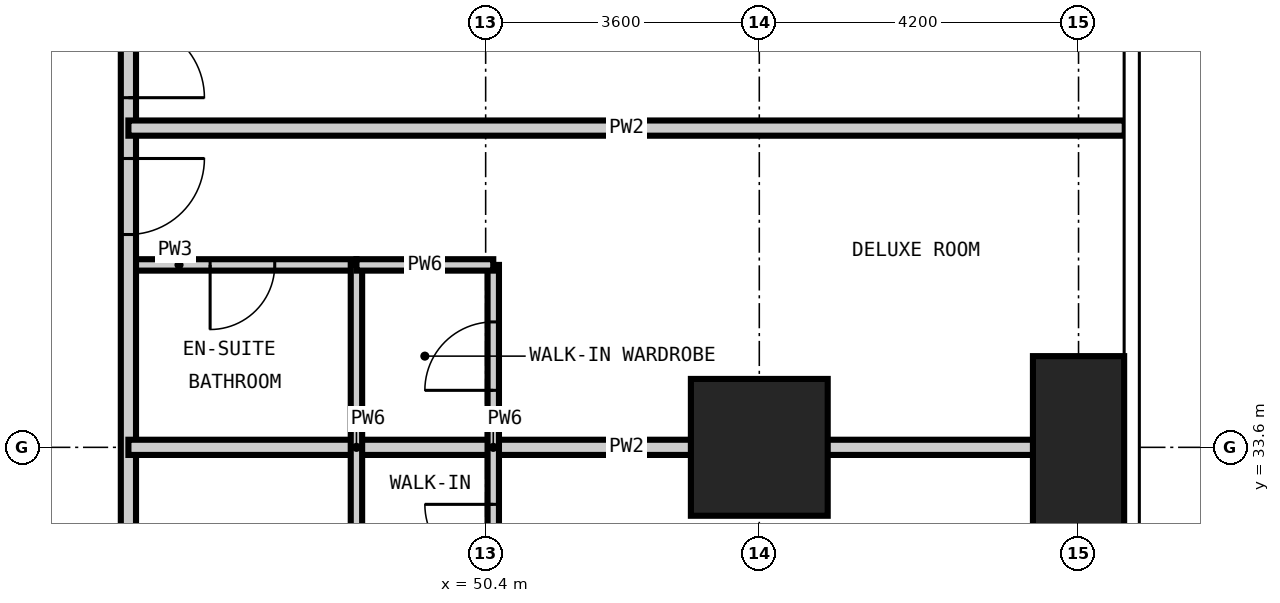
"""IFC4 building model, lengths in metres.
Left out: names, types, materials, properties, quantities, classifications, styles, units other than length and angle.
Written with IfcOpenShell. Run it as: python <this file> out.ifc"""

import sys

from ifc_helpers import new_model, si_unit, direction, frame, frame_2d, origin, origin_2d, place, context, subcontext, project, spatial, rectangle, extrude, element, fill, save


model = new_model("IFC4")
c1 = context("Model", 3, precision=1e-05, world=origin(), true_north=direction((0.0, 1.0)))
c2 = subcontext(c1, "Body", "Model", "MODEL_VIEW")
j1 = project(units=[si_unit("LENGTHUNIT", "METRE"), si_unit("PLANEANGLEUNIT", "RADIAN")], contexts=[c1])
p1 = place(None, origin())
s1 = spatial("IfcSite", under=j1, at=p1, CompositionType="ELEMENT")
p2 = place(p1, origin())
s2 = spatial("IfcBuilding", under=s1, at=p2, CompositionType="ELEMENT")
p3 = place(p2, frame((0.0, 0.0, 27.0)))
s3 = spatial("IfcBuildingStorey", under=s2, at=p3, CompositionType="ELEMENT", Elevation=27.0)
p4 = place(p3, frame((54.0, 33.6, -0.35), z_axis=(0.0, 0.0, 1.0), x_axis=(1.0, 0.0, 0.0)))
e1 = element("IfcColumn", 1, at=p4, inside=s3, PredefinedType="COLUMN", context=c2, shape_type="SweptSolid", body=[
    extrude(rectangle(XDim=1.8, YDim=1.8, at=origin_2d()), origin(), (0.0, 0.0, 1.0), 3.6),
])
p5 = place(p3, frame((58.2, 33.6, -0.35), z_axis=(0.0, 0.0, 1.0), x_axis=(1.0, 0.0, 0.0)))
e2 = element("IfcColumn", 2, at=p5, inside=s3, PredefinedType="COLUMN", context=c2, shape_type="SweptSolid", body=[
    extrude(rectangle(XDim=1.2, YDim=2.4, at=origin_2d()), origin(), (0.0, 0.0, 1.0), 3.6),
])
p6 = place(p3, frame((45.7, 36.0, 0.0), z_axis=(0.0, 0.0, 1.0), x_axis=(1.0, 0.0, 0.0)))
e3 = element("IfcWall", 3, at=p6, inside=s3, PredefinedType="PARTITIONING", context=c2, shape_type="SweptSolid", body=[
    extrude(rectangle(XDim=3.0, YDim=0.15, at=frame_2d((1.5, 0.0))), origin(), (0.0, 0.0, 1.0), 3.25),
])
p7 = place(p6, frame((1.075, 0.0, 0.0)))
e4 = element("IfcOpeningElement", 4, at=p7, cuts=e3, PredefinedType="OPENING", context=c2, shape_type="SweptSolid", body=[
    extrude(rectangle(XDim=0.85, YDim=2.1, at=frame_2d((0.425, 1.05))), frame((0.0, 0.085, 0.0), z_axis=(0.0, -1.0, 0.0), x_axis=(1.0, 0.0, 0.0)), (0.0, 0.0, 1.0), 0.17),
])
p8 = place(p3, frame((45.7, 46.0, 0.0), z_axis=(0.0, 0.0, 1.0), x_axis=(0.0, -1.0, 0.0)))
e5 = element("IfcWall", 5, at=p8, inside=s3, PredefinedType="PARTITIONING", context=c2, shape_type="SweptSolid", body=[
    extrude(rectangle(XDim=32.6, YDim=0.2, at=frame_2d((16.3, 0.0))), origin(), (0.0, 0.0, 1.0), 3.25),
])
p9 = place(p8, frame((26.6, 0.0, 0.0)))
e6 = element("IfcOpeningElement", 6, at=p9, cuts=e5, PredefinedType="OPENING", context=c2, shape_type="SweptSolid", body=[
    extrude(rectangle(XDim=1.0, YDim=2.2, at=frame_2d((0.5, 1.1))), frame((0.0, 0.11, 0.0), z_axis=(0.0, -1.0, 0.0), x_axis=(1.0, 0.0, 0.0)), (0.0, 0.0, 1.0), 0.22),
])
p10 = place(p8, frame((22.4, 0.0, 0.0)))
e7 = element("IfcOpeningElement", 7, at=p10, cuts=e5, PredefinedType="OPENING", context=c2, shape_type="SweptSolid", body=[
    extrude(rectangle(XDim=1.0, YDim=2.2, at=frame_2d((0.5, 1.1))), frame((0.0, 0.11, 0.0), z_axis=(0.0, -1.0, 0.0), x_axis=(1.0, 0.0, 0.0)), (0.0, 0.0, 1.0), 0.22),
])
p11 = place(p8, frame((17.0, 0.0, 0.0)))
e8 = element("IfcOpeningElement", 8, at=p11, cuts=e5, PredefinedType="OPENING", context=c2, shape_type="SweptSolid", body=[
    extrude(rectangle(XDim=1.0, YDim=2.2, at=frame_2d((0.5, 1.1))), frame((0.0, 0.11, 0.0), z_axis=(0.0, -1.0, 0.0), x_axis=(1.0, 0.0, 0.0)), (0.0, 0.0, 1.0), 0.22),
])
p12 = place(p8, frame((15.2, 0.0, 0.0)))
e9 = element("IfcOpeningElement", 9, at=p12, cuts=e5, PredefinedType="OPENING", context=c2, shape_type="SweptSolid", body=[
    extrude(rectangle(XDim=1.0, YDim=2.2, at=frame_2d((0.5, 1.1))), frame((0.0, 0.11, 0.0), z_axis=(0.0, -1.0, 0.0), x_axis=(1.0, 0.0, 0.0)), (0.0, 0.0, 1.0), 0.22),
])
p13 = place(p8, frame((8.6, 0.0, 0.0)))
e10 = element("IfcOpeningElement", 10, at=p13, cuts=e5, PredefinedType="OPENING", context=c2, shape_type="SweptSolid", body=[
    extrude(rectangle(XDim=1.0, YDim=2.2, at=frame_2d((0.5, 1.1))), frame((0.0, 0.11, 0.0), z_axis=(0.0, -1.0, 0.0), x_axis=(1.0, 0.0, 0.0)), (0.0, 0.0, 1.0), 0.22),
])
p14 = place(p8, frame((6.8, 0.0, 0.0)))
e11 = element("IfcOpeningElement", 11, at=p14, cuts=e5, PredefinedType="OPENING", context=c2, shape_type="SweptSolid", body=[
    extrude(rectangle(XDim=1.0, YDim=2.2, at=frame_2d((0.5, 1.1))), frame((0.0, 0.11, 0.0), z_axis=(0.0, -1.0, 0.0), x_axis=(1.0, 0.0, 0.0)), (0.0, 0.0, 1.0), 0.22),
])
p15 = place(p8, frame((30.4, 0.0, 0.0)))
e12 = element("IfcOpeningElement", 12, at=p15, cuts=e5, PredefinedType="OPENING", context=c2, shape_type="SweptSolid", body=[
    extrude(rectangle(XDim=1.0, YDim=2.2, at=frame_2d((0.5, 1.1))), frame((0.0, 0.11, 0.0), z_axis=(0.0, -1.0, 0.0), x_axis=(1.0, 0.0, 0.0)), (0.0, 0.0, 1.0), 0.22),
])
p16 = place(p8, frame((1.5, 0.0, 0.0)))
e13 = element("IfcOpeningElement", 13, at=p16, cuts=e5, PredefinedType="OPENING", context=c2, shape_type="SweptSolid", body=[
    extrude(rectangle(XDim=1.0, YDim=2.2, at=frame_2d((0.5, 1.1))), frame((0.0, 0.11, 0.0), z_axis=(0.0, -1.0, 0.0), x_axis=(1.0, 0.0, 0.0)), (0.0, 0.0, 1.0), 0.22),
])
for number, where, z_axis, x_axis in (
    (14, (45.7, 33.6, 0.0), (0.0, 0.0, 1.0), (1.0, 0.0, 0.0)),
    (15, (45.7, 37.8, 0.0), (0.0, 0.0, 1.0), (1.0, 0.0, 0.0)),
):
    element("IfcWall", number, at=place(p3, frame(where, z_axis=z_axis, x_axis=x_axis)), inside=s3, PredefinedType="PARTITIONING", context=c2, shape_type="SweptSolid", body=[
        extrude(rectangle(XDim=13.108, YDim=0.2, at=frame_2d((6.554, 0.0))), origin(), (0.0, 0.0, 1.0), 3.25),
    ])
p17 = place(p3, frame((48.7, 31.2, 0.0), z_axis=(0.0, 0.0, 1.0), x_axis=(0.0, 1.0, 0.0)))
e16 = element("IfcWall", 16, at=p17, inside=s3, PredefinedType="PARTITIONING", context=c2, shape_type="SweptSolid", body=[
    extrude(rectangle(XDim=4.8, YDim=0.15, at=frame_2d((2.4, 0.0))), origin(), (0.0, 0.0, 1.0), 3.25),
])
p18 = place(p3, frame((50.5, 31.2, 0.0), z_axis=(0.0, 0.0, 1.0), x_axis=(0.0, 1.0, 0.0)))
e17 = element("IfcWall", 17, at=p18, inside=s3, PredefinedType="PARTITIONING", context=c2, shape_type="SweptSolid", body=[
    extrude(rectangle(XDim=4.8, YDim=0.15, at=frame_2d((2.4, 0.0))), origin(), (0.0, 0.0, 1.0), 3.25),
])
p19 = place(p18, frame((0.75, 0.0, 0.0)))
e18 = element("IfcOpeningElement", 18, at=p19, cuts=e17, PredefinedType="OPENING", context=c2, shape_type="SweptSolid", body=[
    extrude(rectangle(XDim=0.9, YDim=2.1, at=frame_2d((0.45, 1.05))), frame((0.0, 0.085, 0.0), z_axis=(0.0, -1.0, 0.0), x_axis=(1.0, 0.0, 0.0)), (0.0, 0.0, 1.0), 0.17),
])
p20 = place(p18, frame((3.15, 0.0, 0.0)))
e19 = element("IfcOpeningElement", 19, at=p20, cuts=e17, PredefinedType="OPENING", context=c2, shape_type="SweptSolid", body=[
    extrude(rectangle(XDim=0.9, YDim=2.1, at=frame_2d((0.45, 1.05))), frame((0.0, 0.085, 0.0), z_axis=(0.0, -1.0, 0.0), x_axis=(1.0, 0.0, 0.0)), (0.0, 0.0, 1.0), 0.17),
])
p21 = place(p3, frame((48.7, 36.0, 0.0), z_axis=(0.0, 0.0, 1.0), x_axis=(1.0, 0.0, 0.0)))
e20 = element("IfcWall", 20, at=p21, inside=s3, PredefinedType="PARTITIONING", context=c2, shape_type="SweptSolid", body=[
    extrude(rectangle(XDim=1.8, YDim=0.15, at=frame_2d((0.9, 0.0))), origin(), (0.0, 0.0, 1.0), 3.25),
])
p22 = place(p19, origin())
e21 = element("IfcDoor", 21, at=p22, inside=s3, OperationType="SINGLE_SWING_RIGHT", PredefinedType="DOOR", context=c2, shape_type="SweptSolid", body=[
    extrude(rectangle(XDim=0.9, YDim=2.1, at=frame_2d((0.45, 1.05))), frame((0.0, 0.025, 0.0), z_axis=(0.0, -1.0, 0.0), x_axis=(1.0, 0.0, 0.0)), (0.0, 0.0, 1.0), 0.05),
])
fill(e18, e21)
p23 = place(p13, origin())
e22 = element("IfcDoor", 22, at=p23, inside=s3, OperationType="SINGLE_SWING_LEFT", PredefinedType="DOOR", context=c2, shape_type="SweptSolid", body=[
    extrude(rectangle(XDim=1.0, YDim=2.2, at=frame_2d((0.5, 1.1))), frame((0.0, 0.025, 0.0), z_axis=(0.0, -1.0, 0.0), x_axis=(1.0, 0.0, 0.0)), (0.0, 0.0, 1.0), 0.05),
])
fill(e10, e22)
p24 = place(p7, frame((0.85, 0.0, 0.0), z_axis=(0.0, 0.0, 1.0), x_axis=(-1.0, 0.0, 0.0)))
e23 = element("IfcDoor", 23, at=p24, inside=s3, OperationType="SINGLE_SWING_RIGHT", PredefinedType="DOOR", context=c2, shape_type="SweptSolid", body=[
    extrude(rectangle(XDim=0.85, YDim=2.1, at=frame_2d((0.425, 1.05))), frame((0.0, 0.025, 0.0), z_axis=(0.0, -1.0, 0.0), x_axis=(1.0, 0.0, 0.0)), (0.0, 0.0, 1.0), 0.05),
])
fill(e4, e23)
p25 = place(p20, origin())
e24 = element("IfcDoor", 24, at=p25, inside=s3, OperationType="SINGLE_SWING_LEFT", PredefinedType="DOOR", context=c2, shape_type="SweptSolid", body=[
    extrude(rectangle(XDim=0.9, YDim=2.1, at=frame_2d((0.45, 1.05))), frame((0.0, 0.025, 0.0), z_axis=(0.0, -1.0, 0.0), x_axis=(1.0, 0.0, 0.0)), (0.0, 0.0, 1.0), 0.05),
])
fill(e19, e24)
p26 = place(p14, origin())
e25 = element("IfcDoor", 25, at=p26, inside=s3, OperationType="SINGLE_SWING_RIGHT", PredefinedType="DOOR", context=c2, shape_type="SweptSolid", body=[
    extrude(rectangle(XDim=1.0, YDim=2.2, at=frame_2d((0.5, 1.1))), frame((0.0, 0.025, 0.0), z_axis=(0.0, -1.0, 0.0), x_axis=(1.0, 0.0, 0.0)), (0.0, 0.0, 1.0), 0.05),
])
fill(e11, e25)
save(model, sys.argv[1])
